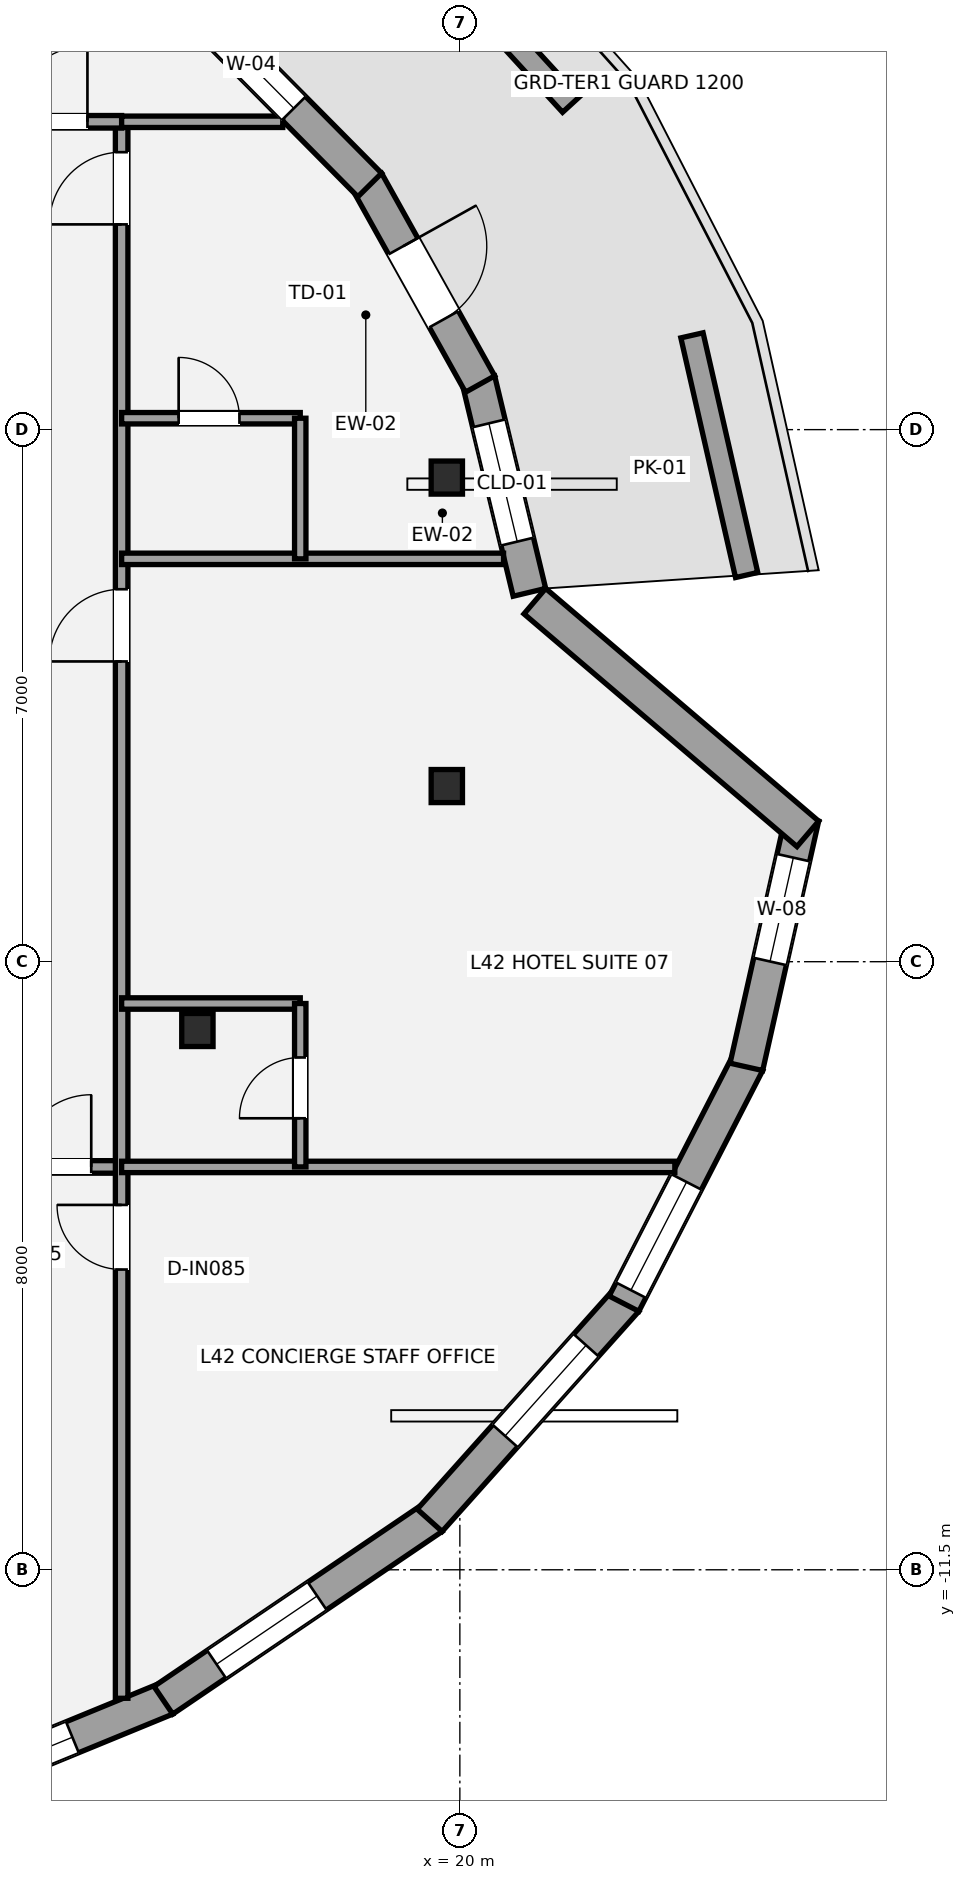
"""IFC4 building model, lengths in metres.
Left out: names, types, materials, properties, quantities, classifications, styles, units other than length and angle.
Written with IfcOpenShell. Run it as: python <this file> out.ifc"""

import sys

from ifc_helpers import new_model, si_unit, direction, frame, frame_2d, origin, origin_2d, place, context, subcontext, project, spatial, rectangle, i_section, extrude, element, fill, save


model = new_model("IFC4")
c1 = context("Model", 3, precision=1e-05, world=origin(), true_north=direction((0.0, 1.0)))
c2 = subcontext(c1, "Body", "Model", "MODEL_VIEW")
j1 = project(units=[si_unit("LENGTHUNIT", "METRE"), si_unit("PLANEANGLEUNIT", "RADIAN")], contexts=[c1])
p1 = place(None, origin())
s1 = spatial("IfcSite", under=j1, at=p1, CompositionType="ELEMENT")
p2 = place(p1, origin())
s2 = spatial("IfcBuilding", under=s1, at=p2, CompositionType="ELEMENT")
p3 = place(p2, frame((0.0, 0.0, 156.6)))
s3 = spatial("IfcBuildingStorey", under=s2, at=p3, CompositionType="ELEMENT", Elevation=156.6)
for number, where, z_axis, x_axis in (
    (1, (19.828, 2.869, 0.0), (0.0, 0.0, 1.0), (1.0, 0.0, 0.0)),
    (2, (16.547, -4.398, 0.0), (0.0, 0.0, 1.0), (1.0, 0.0, 0.0)),
    (3, (19.828, -1.189, 0.0), (0.0, 0.0, 1.0), (1.0, 0.0, 0.0)),
):
    element("IfcColumn", number, at=place(p3, frame(where, z_axis=z_axis, x_axis=x_axis)), inside=s3, PredefinedType="COLUMN", context=c2, shape_type="SweptSolid", body=[
        extrude(i_section(OverallWidth=0.412, OverallDepth=0.435, WebThickness=0.036, FlangeThickness=0.057, at=origin_2d()), origin(), (0.0, 0.0, 1.0), 3.2),
    ])
p4 = place(p3, frame((20.244, 4.156, 0.0), z_axis=(0.0, 0.0, 1.0), x_axis=(0.233315150808, -0.972401172564, 0.0)))
e4 = element("IfcWall", 4, at=p4, inside=s3, PredefinedType="STANDARD", context=c2, shape_type="SweptSolid", body=[
    extrude(rectangle(XDim=2.875, YDim=0.44, at=frame_2d((1.438, 0.0))), origin(), (0.0, 0.0, 1.0), 2.319),
])
p5 = place(p4, frame((0.589, 0.0, 0.58)))
e5 = element("IfcOpeningElement", 5, at=p5, cuts=e4, PredefinedType="OPENING", context=c2, shape_type="SweptSolid", body=[
    extrude(rectangle(XDim=1.6, YDim=1.55, at=frame_2d((0.8, 0.775))), frame((0.0, 0.23, 0.0), z_axis=(0.0, -1.0, 0.0), x_axis=(1.0, 0.0, 0.0)), (0.0, 0.0, 1.0), 0.46),
])
p6 = place(p3, frame((18.778, 6.766, 0.0), z_axis=(0.0, 0.0, 1.0), x_axis=(0.487244227645, -0.873265745708, 0.0)))
e6 = element("IfcWall", 6, at=p6, inside=s3, PredefinedType="STANDARD", context=c2, shape_type="SweptSolid", body=[
    extrude(rectangle(XDim=3.053, YDim=0.44, at=frame_2d((1.527, 0.0))), origin(), (0.0, 0.0, 1.0), 2.319),
])
p7 = place(p6, frame((0.977, 0.0, 0.0)))
e7 = element("IfcOpeningElement", 7, at=p7, cuts=e6, PredefinedType="OPENING", context=c2, shape_type="SweptSolid", body=[
    extrude(rectangle(XDim=1.1, YDim=2.15, at=frame_2d((0.55, 1.075))), frame((0.0, 0.23, 0.0), z_axis=(0.0, -1.0, 0.0), x_axis=(1.0, 0.0, 0.0)), (0.0, 0.0, 1.0), 0.46),
])
p8 = place(p3, frame((16.412, 9.145, 0.0), z_axis=(0.0, 0.0, 1.0), x_axis=(0.703666281918, -0.71053062122, 0.0)))
e8 = element("IfcWall", 8, at=p8, inside=s3, PredefinedType="STANDARD", context=c2, shape_type="SweptSolid", body=[
    extrude(rectangle(XDim=3.414, YDim=0.44, at=frame_2d((1.707, 0.0))), origin(), (0.0, 0.0, 1.0), 2.319),
])
p9 = place(p8, frame((0.395, 0.0, 0.58)))
e9 = element("IfcOpeningElement", 9, at=p9, cuts=e8, PredefinedType="OPENING", context=c2, shape_type="SweptSolid", body=[
    extrude(rectangle(XDim=1.6, YDim=1.55, at=frame_2d((0.8, 0.775))), frame((0.0, 0.23, 0.0), z_axis=(0.0, -1.0, 0.0), x_axis=(1.0, 0.0, 0.0)), (0.0, 0.0, 1.0), 0.46),
])
p10 = place(p3, frame((16.138, -13.195, 0.0), z_axis=(0.0, 0.0, 1.0), x_axis=(-0.925044361302, -0.3798590918, 0.0)))
e10 = element("IfcWall", 10, at=p10, inside=s3, PredefinedType="STANDARD", context=c2, shape_type="SweptSolid", body=[
    extrude(rectangle(XDim=4.619, YDim=0.44, at=frame_2d((2.31, 0.0))), origin(), (0.0, 0.0, 1.0), 2.315),
])
p11 = place(p10, frame((1.337, 0.0, 0.58)))
e11 = element("IfcOpeningElement", 11, at=p11, cuts=e10, PredefinedType="OPENING", context=c2, shape_type="SweptSolid", body=[
    extrude(rectangle(XDim=1.6, YDim=1.55, at=frame_2d((0.8, 0.775))), frame((0.0, 0.23, 0.0), z_axis=(0.0, -1.0, 0.0), x_axis=(1.0, 0.0, 0.0)), (0.0, 0.0, 1.0), 0.46),
])
p12 = place(p3, frame((19.643, -10.814, 0.0), z_axis=(0.0, 0.0, 1.0), x_axis=(-0.827771778383, -0.561064954272, 0.0)))
e12 = element("IfcWall", 12, at=p12, inside=s3, PredefinedType="STANDARD", context=c2, shape_type="SweptSolid", body=[
    extrude(rectangle(XDim=4.282, YDim=0.44, at=frame_2d((2.141, 0.0))), origin(), (0.0, 0.0, 1.0), 2.315),
])
p13 = place(p12, frame((1.837, 0.0, 0.58)))
e13 = element("IfcOpeningElement", 13, at=p13, cuts=e12, PredefinedType="OPENING", context=c2, shape_type="SweptSolid", body=[
    extrude(rectangle(XDim=1.6, YDim=1.55, at=frame_2d((0.8, 0.775))), frame((0.0, 0.23, 0.0), z_axis=(0.0, -1.0, 0.0), x_axis=(1.0, 0.0, 0.0)), (0.0, 0.0, 1.0), 0.46),
])
p14 = place(p3, frame((22.191, -7.953, 0.0), z_axis=(0.0, 0.0, 1.0), x_axis=(-0.666335444554, -0.745652114147, 0.0)))
e14 = element("IfcWall", 14, at=p14, inside=s3, PredefinedType="STANDARD", context=c2, shape_type="SweptSolid", body=[
    extrude(rectangle(XDim=3.885, YDim=0.44, at=frame_2d((1.942, 0.0))), origin(), (0.0, 0.0, 1.0), 2.315),
])
p15 = place(p14, frame((0.795, 0.0, 0.58)))
e15 = element("IfcOpeningElement", 15, at=p15, cuts=e14, PredefinedType="OPENING", context=c2, shape_type="SweptSolid", body=[
    extrude(rectangle(XDim=1.6, YDim=1.55, at=frame_2d((0.8, 0.775))), frame((0.0, 0.23, 0.0), z_axis=(0.0, -1.0, 0.0), x_axis=(1.0, 0.0, 0.0)), (0.0, 0.0, 1.0), 0.46),
])
p16 = place(p3, frame((23.789, -4.831, 0.0), z_axis=(0.0, 0.0, 1.0), x_axis=(-0.457409955052, -0.889255943483, 0.0)))
e16 = element("IfcWall", 16, at=p16, inside=s3, PredefinedType="STANDARD", context=c2, shape_type="SweptSolid", body=[
    extrude(rectangle(XDim=3.562, YDim=0.44, at=frame_2d((1.781, 0.0))), origin(), (0.0, 0.0, 1.0), 2.315),
])
p17 = place(p16, frame((1.762, 0.0, 0.58)))
e17 = element("IfcOpeningElement", 17, at=p17, cuts=e16, PredefinedType="OPENING", context=c2, shape_type="SweptSolid", body=[
    extrude(rectangle(XDim=1.6, YDim=1.55, at=frame_2d((0.8, 0.775))), frame((0.0, 0.23, 0.0), z_axis=(0.0, -1.0, 0.0), x_axis=(1.0, 0.0, 0.0)), (0.0, 0.0, 1.0), 0.46),
])
p18 = place(p3, frame((24.506, -1.602, 0.0), z_axis=(0.0, 0.0, 1.0), x_axis=(-0.219028468724, -0.97571846856, 0.0)))
e18 = element("IfcWall", 18, at=p18, inside=s3, PredefinedType="STANDARD", context=c2, shape_type="SweptSolid", body=[
    extrude(rectangle(XDim=3.363, YDim=0.44, at=frame_2d((1.681, 0.0))), origin(), (0.0, 0.0, 1.0), 2.315),
])
p19 = place(p18, frame((0.542, 0.0, 0.58)))
e19 = element("IfcOpeningElement", 19, at=p19, cuts=e18, PredefinedType="OPENING", context=c2, shape_type="SweptSolid", body=[
    extrude(rectangle(XDim=1.4, YDim=1.55, at=frame_2d((0.7, 0.775))), frame((0.0, 0.23, 0.0), z_axis=(0.0, -1.0, 0.0), x_axis=(1.0, 0.0, 0.0)), (0.0, 0.0, 1.0), 0.46),
])
p20 = place(p3, frame((20.986, 1.243, 0.0), z_axis=(0.0, 0.0, 1.0), x_axis=(0.761097562451, -0.648637418309, 0.0)))
e20 = element("IfcWall", 20, at=p20, inside=s3, PredefinedType="STANDARD", context=c2, shape_type="SweptSolid", body=[
    extrude(rectangle(XDim=4.719, YDim=0.44, at=frame_2d((2.36, 0.0))), origin(), (0.0, 0.0, 1.0), 2.319),
])
p21 = place(p3, frame((23.773, 1.587, 0.0), z_axis=(0.0, 0.0, 1.0), x_axis=(-0.222377960138, 0.974960533993, 0.0)))
e21 = element("IfcWall", 21, at=p21, inside=s3, PredefinedType="PARAPET", context=c2, shape_type="SweptSolid", body=[
    extrude(rectangle(XDim=3.234, YDim=0.3, at=frame_2d((1.617, 0.0))), origin(), (0.0, 0.0, 1.0), 0.45),
])
p22 = place(p3, frame((21.462, 7.776, 0.0), z_axis=(0.0, 0.0, 1.0), x_axis=(-0.675281078683, 0.737560482112, 0.0)))
e22 = element("IfcWall", 22, at=p22, inside=s3, PredefinedType="PARAPET", context=c2, shape_type="SweptSolid", body=[
    extrude(rectangle(XDim=3.74, YDim=0.3, at=frame_2d((1.87, 0.0))), origin(), (0.0, 0.0, 1.0), 0.45),
])
p23 = place(p3, frame((-15.75, -6.2, 0.0), z_axis=(0.0, 0.0, 1.0), x_axis=(1.0, 0.0, 0.0)))
e23 = element("IfcWall", 23, at=p23, inside=s3, PredefinedType="PARTITIONING", context=c2, shape_type="SweptSolid", body=[
    extrude(rectangle(XDim=31.3, YDim=0.165, at=frame_2d((15.65, 0.0))), origin(), (0.0, 0.0, 1.0), 2.398),
])
p24 = place(p23, frame((8.12, 0.0, 0.0)))
e24 = element("IfcOpeningElement", 24, at=p24, cuts=e23, PredefinedType="OPENING", context=c2, shape_type="SweptSolid", body=[
    extrude(rectangle(XDim=0.95, YDim=2.15, at=frame_2d((0.475, 1.075))), frame((0.0, 0.093, 0.0), z_axis=(0.0, -1.0, 0.0), x_axis=(1.0, 0.0, 0.0)), (0.0, 0.0, 1.0), 0.185),
])
p25 = place(p23, frame((19.6, 0.0, 0.0)))
e25 = element("IfcOpeningElement", 25, at=p25, cuts=e23, PredefinedType="OPENING", context=c2, shape_type="SweptSolid", body=[
    extrude(rectangle(XDim=0.95, YDim=2.15, at=frame_2d((0.475, 1.075))), frame((0.0, 0.093, 0.0), z_axis=(0.0, -1.0, 0.0), x_axis=(1.0, 0.0, 0.0)), (0.0, 0.0, 1.0), 0.185),
])
p26 = place(p23, frame((29.95, 0.0, 0.0)))
e26 = element("IfcOpeningElement", 26, at=p26, cuts=e23, PredefinedType="OPENING", context=c2, shape_type="SweptSolid", body=[
    extrude(rectangle(XDim=0.95, YDim=2.15, at=frame_2d((0.475, 1.075))), frame((0.0, 0.093, 0.0), z_axis=(0.0, -1.0, 0.0), x_axis=(1.0, 0.0, 0.0)), (0.0, 0.0, 1.0), 0.185),
])
p27 = place(p3, frame((15.55, -13.191, 0.0), z_axis=(0.0, 0.0, 1.0), x_axis=(0.0, 1.0, 0.0)))
e27 = element("IfcWall", 27, at=p27, inside=s3, PredefinedType="PARTITIONING", context=c2, shape_type="SweptSolid", body=[
    extrude(rectangle(XDim=20.741, YDim=0.165, at=frame_2d((10.37, 0.0))), origin(), (0.0, 0.0, 1.0), 2.473),
])
p28 = place(p27, frame((5.641, 0.0, 0.0)))
e28 = element("IfcOpeningElement", 28, at=p28, cuts=e27, PredefinedType="OPENING", context=c2, shape_type="SweptSolid", body=[
    extrude(rectangle(XDim=0.85, YDim=2.1, at=frame_2d((0.425, 1.05))), frame((0.0, 0.093, 0.0), z_axis=(0.0, -1.0, 0.0), x_axis=(1.0, 0.0, 0.0)), (0.0, 0.0, 1.0), 0.185),
])
p29 = place(p27, frame((13.641, 0.0, 0.0)))
e29 = element("IfcOpeningElement", 29, at=p29, cuts=e27, PredefinedType="OPENING", context=c2, shape_type="SweptSolid", body=[
    extrude(rectangle(XDim=0.95, YDim=2.15, at=frame_2d((0.475, 1.075))), frame((0.0, 0.093, 0.0), z_axis=(0.0, -1.0, 0.0), x_axis=(1.0, 0.0, 0.0)), (0.0, 0.0, 1.0), 0.185),
])
p30 = place(p27, frame((19.391, 0.0, 0.0)))
e30 = element("IfcOpeningElement", 30, at=p30, cuts=e27, PredefinedType="OPENING", context=c2, shape_type="SweptSolid", body=[
    extrude(rectangle(XDim=0.95, YDim=2.15, at=frame_2d((0.475, 1.075))), frame((0.0, 0.093, 0.0), z_axis=(0.0, -1.0, 0.0), x_axis=(1.0, 0.0, 0.0)), (0.0, 0.0, 1.0), 0.185),
])
p31 = place(p3, frame((13.8, 7.55, 0.0), z_axis=(0.0, 0.0, 1.0), x_axis=(1.0, 0.0, 0.0)))
e31 = element("IfcWall", 31, at=p31, inside=s3, PredefinedType="PARTITIONING", context=c2, shape_type="SweptSolid", body=[
    extrude(rectangle(XDim=1.75, YDim=0.165, at=frame_2d((0.875, 0.0))), origin(), (0.0, 0.0, 1.0), 2.473),
])
p32 = place(p31, frame((0.3, 0.0, 0.0)))
e32 = element("IfcOpeningElement", 32, at=p32, cuts=e31, PredefinedType="OPENING", context=c2, shape_type="SweptSolid", body=[
    extrude(rectangle(XDim=1.0, YDim=2.15, at=frame_2d((0.5, 1.075))), frame((0.0, 0.093, 0.0), z_axis=(0.0, -1.0, 0.0), x_axis=(1.0, 0.0, 0.0)), (0.0, 0.0, 1.0), 0.185),
])
p33 = place(p3, frame((15.55, 7.55, 0.0), z_axis=(0.0, 0.0, 1.0), x_axis=(1.0, 0.0, 0.0)))
e33 = element("IfcWall", 33, at=p33, inside=s3, PredefinedType="PLUMBINGWALL", context=c2, shape_type="SweptSolid", body=[
    extrude(rectangle(XDim=2.12, YDim=0.15, at=frame_2d((1.06, 0.0))), origin(), (0.0, 0.0, 1.0), 2.473),
])
p34 = place(p3, frame((15.55, -6.2, 0.0), z_axis=(0.0, 0.0, 1.0), x_axis=(1.0, 0.0, 0.0)))
e34 = element("IfcWall", 34, at=p34, inside=s3, PredefinedType="PLUMBINGWALL", context=c2, shape_type="SweptSolid", body=[
    extrude(rectangle(XDim=7.278, YDim=0.15, at=frame_2d((3.639, 0.0))), origin(), (0.0, 0.0, 1.0), 2.473),
])
p35 = place(p3, frame((15.55, 1.8, 0.0), z_axis=(0.0, 0.0, 1.0), x_axis=(1.0, 0.0, 0.0)))
e35 = element("IfcWall", 35, at=p35, inside=s3, PredefinedType="PLUMBINGWALL", context=c2, shape_type="SweptSolid", body=[
    extrude(rectangle(XDim=5.025, YDim=0.15, at=frame_2d((2.512, 0.0))), origin(), (0.0, 0.0, 1.0), 2.473),
])
p36 = place(p3, frame((15.55, -4.05, 0.0), z_axis=(0.0, 0.0, 1.0), x_axis=(1.0, 0.0, 0.0)))
e36 = element("IfcWall", 36, at=p36, inside=s3, PredefinedType="PLUMBINGWALL", context=c2, shape_type="SweptSolid", body=[
    extrude(rectangle(XDim=2.35, YDim=0.15, at=frame_2d((1.175, 0.0))), origin(), (0.0, 0.0, 1.0), 2.398),
])
p37 = place(p3, frame((17.9, -6.2, 0.0), z_axis=(0.0, 0.0, 1.0), x_axis=(0.0, 1.0, 0.0)))
e37 = element("IfcWall", 37, at=p37, inside=s3, PredefinedType="PLUMBINGWALL", context=c2, shape_type="SweptSolid", body=[
    extrude(rectangle(XDim=2.15, YDim=0.15, at=frame_2d((1.075, 0.0))), origin(), (0.0, 0.0, 1.0), 3.02),
])
p38 = place(p37, frame((0.64, 0.0, 0.0)))
e38 = element("IfcOpeningElement", 38, at=p38, cuts=e37, PredefinedType="OPENING", context=c2, shape_type="SweptSolid", body=[
    extrude(rectangle(XDim=0.8, YDim=2.1, at=frame_2d((0.4, 1.05))), frame((0.0, 0.085, 0.0), z_axis=(0.0, -1.0, 0.0), x_axis=(1.0, 0.0, 0.0)), (0.0, 0.0, 1.0), 0.17),
])
p39 = place(p3, frame((15.55, 3.65, 0.0), z_axis=(0.0, 0.0, 1.0), x_axis=(1.0, 0.0, 0.0)))
e39 = element("IfcWall", 39, at=p39, inside=s3, PredefinedType="PLUMBINGWALL", context=c2, shape_type="SweptSolid", body=[
    extrude(rectangle(XDim=2.35, YDim=0.15, at=frame_2d((1.175, 0.0))), origin(), (0.0, 0.0, 1.0), 3.02),
])
p40 = place(p39, frame((0.75, 0.0, 0.0)))
e40 = element("IfcOpeningElement", 40, at=p40, cuts=e39, PredefinedType="OPENING", context=c2, shape_type="SweptSolid", body=[
    extrude(rectangle(XDim=0.8, YDim=2.1, at=frame_2d((0.4, 1.05))), frame((0.0, 0.085, 0.0), z_axis=(0.0, -1.0, 0.0), x_axis=(1.0, 0.0, 0.0)), (0.0, 0.0, 1.0), 0.17),
])
p41 = place(p3, frame((17.9, 1.8, 0.0), z_axis=(0.0, 0.0, 1.0), x_axis=(0.0, 1.0, 0.0)))
e41 = element("IfcWall", 41, at=p41, inside=s3, PredefinedType="PLUMBINGWALL", context=c2, shape_type="SweptSolid", body=[
    extrude(rectangle(XDim=1.85, YDim=0.15, at=frame_2d((0.925, 0.0))), origin(), (0.0, 0.0, 1.0), 2.473),
])
p42 = place(p5, origin())
e42 = element("IfcWindow", 42, at=p42, inside=s3, PartitioningType="SINGLE_PANEL", PredefinedType="WINDOW", context=c2, shape_type="SweptSolid", body=[
    extrude(rectangle(XDim=1.6, YDim=1.55, at=frame_2d((0.8, 0.775))), frame((0.0, -0.01, 0.0), z_axis=(0.0, -1.0, 0.0), x_axis=(1.0, 0.0, 0.0)), (0.0, 0.0, 1.0), 0.06),
])
fill(e5, e42)
p43 = place(p7, origin())
e43 = element("IfcDoor", 43, at=p43, inside=s3, OperationType="SINGLE_SWING_LEFT", PredefinedType="DOOR", context=c2, shape_type="SweptSolid", body=[
    extrude(rectangle(XDim=1.1, YDim=2.15, at=frame_2d((0.55, 1.075))), frame((0.0, 0.025, 0.0), z_axis=(0.0, -1.0, 0.0), x_axis=(1.0, 0.0, 0.0)), (0.0, 0.0, 1.0), 0.05),
])
fill(e7, e43)
p44 = place(p9, origin())
e44 = element("IfcWindow", 44, at=p44, inside=s3, PartitioningType="SINGLE_PANEL", PredefinedType="WINDOW", context=c2, shape_type="SweptSolid", body=[
    extrude(rectangle(XDim=1.6, YDim=1.55, at=frame_2d((0.8, 0.775))), frame((0.0, -0.01, 0.0), z_axis=(0.0, -1.0, 0.0), x_axis=(1.0, 0.0, 0.0)), (0.0, 0.0, 1.0), 0.06),
])
fill(e9, e44)
p45 = place(p11, origin())
e45 = element("IfcWindow", 45, at=p45, inside=s3, PartitioningType="SINGLE_PANEL", PredefinedType="WINDOW", context=c2, shape_type="SweptSolid", body=[
    extrude(rectangle(XDim=1.6, YDim=1.55, at=frame_2d((0.8, 0.775))), frame((0.0, -0.01, 0.0), z_axis=(0.0, -1.0, 0.0), x_axis=(1.0, 0.0, 0.0)), (0.0, 0.0, 1.0), 0.06),
])
fill(e11, e45)
p46 = place(p13, origin())
e46 = element("IfcWindow", 46, at=p46, inside=s3, PartitioningType="SINGLE_PANEL", PredefinedType="WINDOW", context=c2, shape_type="SweptSolid", body=[
    extrude(rectangle(XDim=1.6, YDim=1.55, at=frame_2d((0.8, 0.775))), frame((0.0, -0.01, 0.0), z_axis=(0.0, -1.0, 0.0), x_axis=(1.0, 0.0, 0.0)), (0.0, 0.0, 1.0), 0.06),
])
fill(e13, e46)
p47 = place(p15, origin())
e47 = element("IfcWindow", 47, at=p47, inside=s3, PartitioningType="SINGLE_PANEL", PredefinedType="WINDOW", context=c2, shape_type="SweptSolid", body=[
    extrude(rectangle(XDim=1.6, YDim=1.55, at=frame_2d((0.8, 0.775))), frame((0.0, -0.01, 0.0), z_axis=(0.0, -1.0, 0.0), x_axis=(1.0, 0.0, 0.0)), (0.0, 0.0, 1.0), 0.06),
])
fill(e15, e47)
p48 = place(p17, origin())
e48 = element("IfcWindow", 48, at=p48, inside=s3, PartitioningType="SINGLE_PANEL", PredefinedType="WINDOW", context=c2, shape_type="SweptSolid", body=[
    extrude(rectangle(XDim=1.6, YDim=1.55, at=frame_2d((0.8, 0.775))), frame((0.0, -0.01, 0.0), z_axis=(0.0, -1.0, 0.0), x_axis=(1.0, 0.0, 0.0)), (0.0, 0.0, 1.0), 0.06),
])
fill(e17, e48)
p49 = place(p19, origin())
e49 = element("IfcWindow", 49, at=p49, inside=s3, PartitioningType="SINGLE_PANEL", PredefinedType="WINDOW", context=c2, shape_type="SweptSolid", body=[
    extrude(rectangle(XDim=1.4, YDim=1.55, at=frame_2d((0.7, 0.775))), frame((0.0, -0.01, 0.0), z_axis=(0.0, -1.0, 0.0), x_axis=(1.0, 0.0, 0.0)), (0.0, 0.0, 1.0), 0.06),
])
fill(e19, e49)
p50 = place(p32, origin())
e50 = element("IfcDoor", 50, at=p50, inside=s3, OperationType="SINGLE_SWING_RIGHT", PredefinedType="DOOR", context=c2, shape_type="SweptSolid", body=[
    extrude(rectangle(XDim=1.0, YDim=2.15, at=frame_2d((0.5, 1.075))), frame((0.0, 0.025, 0.0), z_axis=(0.0, -1.0, 0.0), x_axis=(1.0, 0.0, 0.0)), (0.0, 0.0, 1.0), 0.05),
])
fill(e32, e50)
p51 = place(p28, origin())
e51 = element("IfcDoor", 51, at=p51, inside=s3, OperationType="SINGLE_SWING_RIGHT", PredefinedType="DOOR", context=c2, shape_type="SweptSolid", body=[
    extrude(rectangle(XDim=0.85, YDim=2.1, at=frame_2d((0.425, 1.05))), frame((0.0, 0.025, 0.0), z_axis=(0.0, -1.0, 0.0), x_axis=(1.0, 0.0, 0.0)), (0.0, 0.0, 1.0), 0.05),
])
fill(e28, e51)
p52 = place(p26, origin())
e52 = element("IfcDoor", 52, at=p52, inside=s3, OperationType="SINGLE_SWING_RIGHT", PredefinedType="DOOR", context=c2, shape_type="SweptSolid", body=[
    extrude(rectangle(XDim=0.95, YDim=2.15, at=frame_2d((0.475, 1.075))), frame((0.0, 0.025, 0.0), z_axis=(0.0, -1.0, 0.0), x_axis=(1.0, 0.0, 0.0)), (0.0, 0.0, 1.0), 0.05),
])
fill(e26, e52)
p53 = place(p29, origin())
e53 = element("IfcDoor", 53, at=p53, inside=s3, OperationType="SINGLE_SWING_LEFT", PredefinedType="DOOR", context=c2, shape_type="SweptSolid", body=[
    extrude(rectangle(XDim=0.95, YDim=2.15, at=frame_2d((0.475, 1.075))), frame((0.0, 0.025, 0.0), z_axis=(0.0, -1.0, 0.0), x_axis=(1.0, 0.0, 0.0)), (0.0, 0.0, 1.0), 0.05),
])
fill(e29, e53)
p54 = place(p38, origin())
e54 = element("IfcDoor", 54, at=p54, inside=s3, OperationType="SINGLE_SWING_LEFT", PredefinedType="DOOR", context=c2, shape_type="SweptSolid", body=[
    extrude(rectangle(XDim=0.8, YDim=2.1, at=frame_2d((0.4, 1.05))), frame((0.0, 0.025, 0.0), z_axis=(0.0, -1.0, 0.0), x_axis=(1.0, 0.0, 0.0)), (0.0, 0.0, 1.0), 0.05),
])
fill(e38, e54)
p55 = place(p30, origin())
e55 = element("IfcDoor", 55, at=p55, inside=s3, OperationType="SINGLE_SWING_LEFT", PredefinedType="DOOR", context=c2, shape_type="SweptSolid", body=[
    extrude(rectangle(XDim=0.95, YDim=2.15, at=frame_2d((0.475, 1.075))), frame((0.0, 0.025, 0.0), z_axis=(0.0, -1.0, 0.0), x_axis=(1.0, 0.0, 0.0)), (0.0, 0.0, 1.0), 0.05),
])
fill(e30, e55)
p56 = place(p40, origin())
e56 = element("IfcDoor", 56, at=p56, inside=s3, OperationType="SINGLE_SWING_LEFT", PredefinedType="DOOR", context=c2, shape_type="SweptSolid", body=[
    extrude(rectangle(XDim=0.8, YDim=2.1, at=frame_2d((0.4, 1.05))), frame((0.0, 0.025, 0.0), z_axis=(0.0, -1.0, 0.0), x_axis=(1.0, 0.0, 0.0)), (0.0, 0.0, 1.0), 0.05),
])
fill(e40, e56)
save(model, sys.argv[1])
